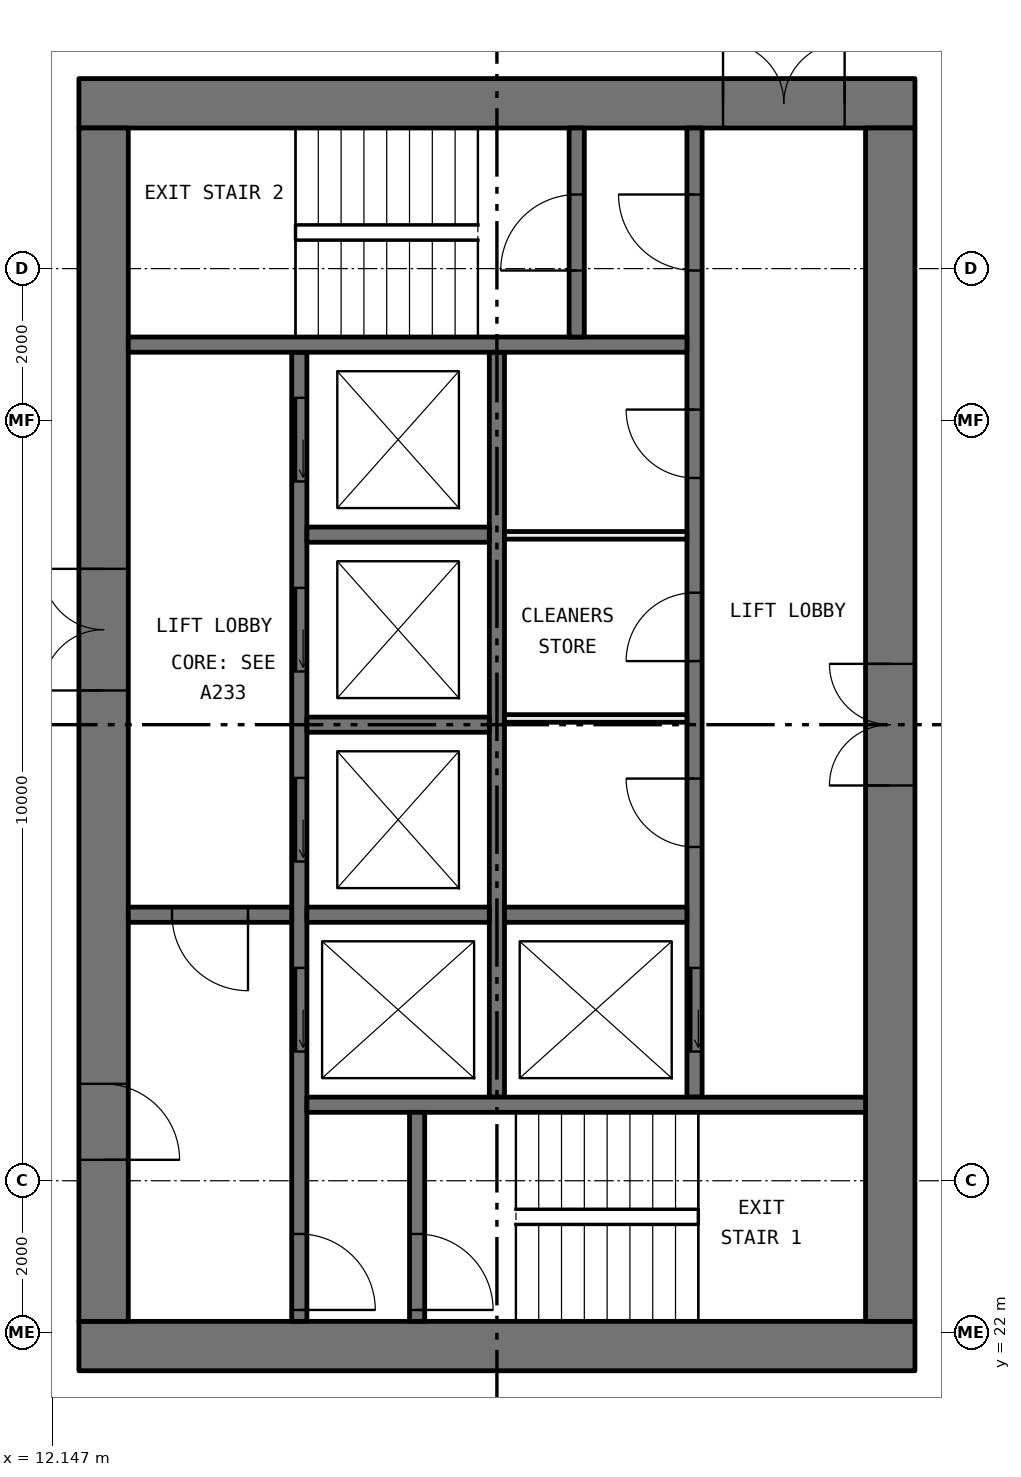
"""IFC4 building model, lengths in metres.
Left out: names, types, materials, properties, quantities, classifications, styles, units other than length and angle.
Written with IfcOpenShell. Run it as: python <this file> out.ifc"""

import sys

from ifc_helpers import new_model, si_unit, direction, frame, frame_2d, origin, place, context, subcontext, project, spatial, rectangle, extrude, element, fill, save


model = new_model("IFC4")
c1 = context("Model", 3, precision=1e-05, world=origin(), true_north=direction((0.0, 1.0)))
c2 = subcontext(c1, "Body", "Model", "MODEL_VIEW")
j1 = project(units=[si_unit("LENGTHUNIT", "METRE"), si_unit("PLANEANGLEUNIT", "RADIAN")], contexts=[c1])
p1 = place(None, origin())
s1 = spatial("IfcSite", under=j1, at=p1, CompositionType="ELEMENT")
p2 = place(p1, origin())
s2 = spatial("IfcBuilding", under=s1, at=p2, CompositionType="ELEMENT")
p3 = place(p2, frame((0.0, 0.0, 124.2)))
s3 = spatial("IfcBuildingStorey", under=s2, at=p3, CompositionType="ELEMENT", Elevation=124.2)
p4 = place(p3, frame((12.5, 21.825, 0.0), z_axis=(0.0, 0.0, 1.0), x_axis=(1.0, 0.0, 0.0)))
e1 = element("IfcWall", 1, at=p4, inside=s3, PredefinedType="SHEAR", context=c2, shape_type="SweptSolid", body=[
    extrude(rectangle(XDim=11.0, YDim=0.65, at=frame_2d((5.5, 0.0))), origin(), (0.0, 0.0, 1.0), 3.05),
])
p5 = place(p3, frame((12.5, 38.175, 0.0), z_axis=(0.0, 0.0, 1.0), x_axis=(1.0, 0.0, 0.0)))
e2 = element("IfcWall", 2, at=p5, inside=s3, PredefinedType="SHEAR", context=c2, shape_type="SweptSolid", body=[
    extrude(rectangle(XDim=11.0, YDim=0.65, at=frame_2d((5.5, 0.0))), origin(), (0.0, 0.0, 1.0), 3.05),
])
p6 = place(p5, frame((8.475, 0.0, 0.0)))
e3 = element("IfcOpeningElement", 3, at=p6, cuts=e2, PredefinedType="OPENING", context=c2, shape_type="SweptSolid", body=[
    extrude(rectangle(XDim=1.6, YDim=2.1, at=frame_2d((0.8, 1.05))), frame((0.0, 0.335, 0.0), z_axis=(0.0, -1.0, 0.0), x_axis=(1.0, 0.0, 0.0)), (0.0, 0.0, 1.0), 0.67),
])
p7 = place(p3, frame((12.825, 22.15, 0.0), z_axis=(0.0, 0.0, 1.0), x_axis=(0.0, 1.0, 0.0)))
e4 = element("IfcWall", 4, at=p7, inside=s3, PredefinedType="SHEAR", context=c2, shape_type="SweptSolid", body=[
    extrude(rectangle(XDim=15.7, YDim=0.65, at=frame_2d((7.85, 0.0))), origin(), (0.0, 0.0, 1.0), 3.05),
])
p8 = place(p7, frame((8.3, 0.0, 0.0)))
e5 = element("IfcOpeningElement", 5, at=p8, cuts=e4, PredefinedType="OPENING", context=c2, shape_type="SweptSolid", body=[
    extrude(rectangle(XDim=1.6, YDim=2.1, at=frame_2d((0.8, 1.05))), frame((0.0, 0.335, 0.0), z_axis=(0.0, -1.0, 0.0), x_axis=(1.0, 0.0, 0.0)), (0.0, 0.0, 1.0), 0.67),
])
p9 = place(p7, frame((2.125, 0.0, 0.0)))
e6 = element("IfcOpeningElement", 6, at=p9, cuts=e4, PredefinedType="OPENING", context=c2, shape_type="SweptSolid", body=[
    extrude(rectangle(XDim=1.0, YDim=2.1, at=frame_2d((0.5, 1.05))), frame((0.0, 0.335, 0.0), z_axis=(0.0, -1.0, 0.0), x_axis=(1.0, 0.0, 0.0)), (0.0, 0.0, 1.0), 0.67),
])
p10 = place(p3, frame((23.175, 22.15, 0.0), z_axis=(0.0, 0.0, 1.0), x_axis=(0.0, 1.0, 0.0)))
e7 = element("IfcWall", 7, at=p10, inside=s3, PredefinedType="SHEAR", context=c2, shape_type="SweptSolid", body=[
    extrude(rectangle(XDim=15.7, YDim=0.65, at=frame_2d((7.85, 0.0))), origin(), (0.0, 0.0, 1.0), 3.05),
])
p11 = place(p10, frame((7.05, 0.0, 0.0)))
e8 = element("IfcOpeningElement", 8, at=p11, cuts=e7, PredefinedType="OPENING", context=c2, shape_type="SweptSolid", body=[
    extrude(rectangle(XDim=1.6, YDim=2.1, at=frame_2d((0.8, 1.05))), frame((0.0, 0.335, 0.0), z_axis=(0.0, -1.0, 0.0), x_axis=(1.0, 0.0, 0.0)), (0.0, 0.0, 1.0), 0.67),
])
p12 = place(p3, frame((15.4, 22.15, 0.0), z_axis=(0.0, 0.0, 1.0), x_axis=(0.0, 1.0, 0.0)))
e9 = element("IfcWall", 9, at=p12, inside=s3, PredefinedType="SOLIDWALL", context=c2, shape_type="SweptSolid", body=[
    extrude(rectangle(XDim=12.75, YDim=0.2, at=frame_2d((6.375, 0.0))), origin(), (0.0, 0.0, 1.0), 3.05),
])
p13 = place(p12, frame((3.55, 0.0, 0.0)))
e10 = element("IfcOpeningElement", 10, at=p13, cuts=e9, PredefinedType="OPENING", context=c2, shape_type="SweptSolid", body=[
    extrude(rectangle(XDim=1.1, YDim=2.1, at=frame_2d((0.55, 1.05))), frame((0.0, 0.11, 0.0), z_axis=(0.0, -1.0, 0.0), x_axis=(1.0, 0.0, 0.0)), (0.0, 0.0, 1.0), 0.22),
])
p14 = place(p12, frame((6.05, 0.0, 0.0)))
e11 = element("IfcOpeningElement", 11, at=p14, cuts=e9, PredefinedType="OPENING", context=c2, shape_type="SweptSolid", body=[
    extrude(rectangle(XDim=1.1, YDim=2.1, at=frame_2d((0.55, 1.05))), frame((0.0, 0.11, 0.0), z_axis=(0.0, -1.0, 0.0), x_axis=(1.0, 0.0, 0.0)), (0.0, 0.0, 1.0), 0.22),
])
p15 = place(p12, frame((8.55, 0.0, 0.0)))
e12 = element("IfcOpeningElement", 12, at=p15, cuts=e9, PredefinedType="OPENING", context=c2, shape_type="SweptSolid", body=[
    extrude(rectangle(XDim=1.1, YDim=2.1, at=frame_2d((0.55, 1.05))), frame((0.0, 0.11, 0.0), z_axis=(0.0, -1.0, 0.0), x_axis=(1.0, 0.0, 0.0)), (0.0, 0.0, 1.0), 0.22),
])
p16 = place(p12, frame((11.05, 0.0, 0.0)))
e13 = element("IfcOpeningElement", 13, at=p16, cuts=e9, PredefinedType="OPENING", context=c2, shape_type="SweptSolid", body=[
    extrude(rectangle(XDim=1.1, YDim=2.1, at=frame_2d((0.55, 1.05))), frame((0.0, 0.11, 0.0), z_axis=(0.0, -1.0, 0.0), x_axis=(1.0, 0.0, 0.0)), (0.0, 0.0, 1.0), 0.22),
])
p17 = place(p12, frame((0.15, 0.0, 0.0)))
e14 = element("IfcOpeningElement", 14, at=p17, cuts=e9, PredefinedType="OPENING", context=c2, shape_type="SweptSolid", body=[
    extrude(rectangle(XDim=1.0, YDim=2.1, at=frame_2d((0.5, 1.05))), frame((0.0, 0.11, 0.0), z_axis=(0.0, -1.0, 0.0), x_axis=(1.0, 0.0, 0.0)), (0.0, 0.0, 1.0), 0.22),
])
p18 = place(p3, frame((20.6, 25.1, 0.0), z_axis=(0.0, 0.0, 1.0), x_axis=(0.0, 1.0, 0.0)))
e15 = element("IfcWall", 15, at=p18, inside=s3, PredefinedType="SOLIDWALL", context=c2, shape_type="SweptSolid", body=[
    extrude(rectangle(XDim=12.75, YDim=0.2, at=frame_2d((6.375, 0.0))), origin(), (0.0, 0.0, 1.0), 3.05),
])
p19 = place(p18, frame((0.6, 0.0, 0.0)))
e16 = element("IfcOpeningElement", 16, at=p19, cuts=e15, PredefinedType="OPENING", context=c2, shape_type="SweptSolid", body=[
    extrude(rectangle(XDim=1.1, YDim=2.1, at=frame_2d((0.55, 1.05))), frame((0.0, 0.11, 0.0), z_axis=(0.0, -1.0, 0.0), x_axis=(1.0, 0.0, 0.0)), (0.0, 0.0, 1.0), 0.22),
])
p20 = place(p18, frame((10.875, 0.0, 0.0)))
e17 = element("IfcOpeningElement", 17, at=p20, cuts=e15, PredefinedType="OPENING", context=c2, shape_type="SweptSolid", body=[
    extrude(rectangle(XDim=1.0, YDim=2.1, at=frame_2d((0.5, 1.05))), frame((0.0, 0.11, 0.0), z_axis=(0.0, -1.0, 0.0), x_axis=(1.0, 0.0, 0.0)), (0.0, 0.0, 1.0), 0.22),
])
p21 = place(p18, frame((3.291, 0.0, 0.0)))
e18 = element("IfcOpeningElement", 18, at=p21, cuts=e15, PredefinedType="OPENING", context=c2, shape_type="SweptSolid", body=[
    extrude(rectangle(XDim=0.9, YDim=2.1, at=frame_2d((0.45, 1.05))), frame((0.0, 0.11, 0.0), z_axis=(0.0, -1.0, 0.0), x_axis=(1.0, 0.0, 0.0)), (0.0, 0.0, 1.0), 0.22),
])
p22 = place(p18, frame((5.737, 0.0, 0.0)))
e19 = element("IfcOpeningElement", 19, at=p22, cuts=e15, PredefinedType="OPENING", context=c2, shape_type="SweptSolid", body=[
    extrude(rectangle(XDim=0.9, YDim=2.1, at=frame_2d((0.45, 1.05))), frame((0.0, 0.11, 0.0), z_axis=(0.0, -1.0, 0.0), x_axis=(1.0, 0.0, 0.0)), (0.0, 0.0, 1.0), 0.22),
])
p23 = place(p18, frame((8.146, 0.0, 0.0)))
e20 = element("IfcOpeningElement", 20, at=p23, cuts=e15, PredefinedType="OPENING", context=c2, shape_type="SweptSolid", body=[
    extrude(rectangle(XDim=0.9, YDim=2.1, at=frame_2d((0.45, 1.05))), frame((0.0, 0.11, 0.0), z_axis=(0.0, -1.0, 0.0), x_axis=(1.0, 0.0, 0.0)), (0.0, 0.0, 1.0), 0.22),
])
p24 = place(p3, frame((18.0, 25.1, 0.0), z_axis=(0.0, 0.0, 1.0), x_axis=(0.0, 1.0, 0.0)))
e21 = element("IfcWall", 21, at=p24, inside=s3, PredefinedType="SOLIDWALL", context=c2, shape_type="SweptSolid", body=[
    extrude(rectangle(XDim=9.8, YDim=0.2, at=frame_2d((4.9, 0.0))), origin(), (0.0, 0.0, 1.0), 3.05),
])
for number, where, z_axis, x_axis in (
    (22, (15.5, 25.0, 0.0), (0.0, 0.0, 1.0), (1.0, 0.0, 0.0)),
    (23, (13.15, 35.0, 0.0), (0.0, 0.0, 1.0), (1.0, 0.0, 0.0)),
):
    element("IfcWall", number, at=place(p3, frame(where, z_axis=z_axis, x_axis=x_axis)), inside=s3, PredefinedType="SOLIDWALL", context=c2, shape_type="SweptSolid", body=[
        extrude(rectangle(XDim=7.35, YDim=0.2, at=frame_2d((3.675, 0.0))), origin(), (0.0, 0.0, 1.0), 3.05),
    ])
p25 = place(p3, frame((13.15, 27.5, 0.0), z_axis=(0.0, 0.0, 1.0), x_axis=(1.0, 0.0, 0.0)))
e24 = element("IfcWall", 24, at=p25, inside=s3, PredefinedType="SOLIDWALL", context=c2, shape_type="SweptSolid", body=[
    extrude(rectangle(XDim=2.15, YDim=0.2, at=frame_2d((1.075, 0.0))), origin(), (0.0, 0.0, 1.0), 3.05),
])
p26 = place(p25, frame((0.575, 0.0, 0.0)))
e25 = element("IfcOpeningElement", 25, at=p26, cuts=e24, PredefinedType="OPENING", context=c2, shape_type="SweptSolid", body=[
    extrude(rectangle(XDim=1.0, YDim=2.1, at=frame_2d((0.5, 1.05))), frame((0.0, 0.11, 0.0), z_axis=(0.0, -1.0, 0.0), x_axis=(1.0, 0.0, 0.0)), (0.0, 0.0, 1.0), 0.22),
])
p27 = place(p3, frame((16.95, 22.15, 0.0), z_axis=(0.0, 0.0, 1.0), x_axis=(0.0, 1.0, 0.0)))
e26 = element("IfcWall", 26, at=p27, inside=s3, PredefinedType="SOLIDWALL", context=c2, shape_type="SweptSolid", body=[
    extrude(rectangle(XDim=2.75, YDim=0.2, at=frame_2d((1.375, 0.0))), origin(), (0.0, 0.0, 1.0), 3.05),
])
p28 = place(p27, frame((0.15, 0.0, 0.0)))
e27 = element("IfcOpeningElement", 27, at=p28, cuts=e26, PredefinedType="OPENING", context=c2, shape_type="SweptSolid", body=[
    extrude(rectangle(XDim=1.0, YDim=2.1, at=frame_2d((0.5, 1.05))), frame((0.0, 0.11, 0.0), z_axis=(0.0, -1.0, 0.0), x_axis=(1.0, 0.0, 0.0)), (0.0, 0.0, 1.0), 0.22),
])
p29 = place(p3, frame((19.05, 35.1, 0.0), z_axis=(0.0, 0.0, 1.0), x_axis=(0.0, 1.0, 0.0)))
e28 = element("IfcWall", 28, at=p29, inside=s3, PredefinedType="SOLIDWALL", context=c2, shape_type="SweptSolid", body=[
    extrude(rectangle(XDim=2.75, YDim=0.2, at=frame_2d((1.375, 0.0))), origin(), (0.0, 0.0, 1.0), 3.05),
])
p30 = place(p29, frame((0.875, 0.0, 0.0)))
e29 = element("IfcOpeningElement", 29, at=p30, cuts=e28, PredefinedType="OPENING", context=c2, shape_type="SweptSolid", body=[
    extrude(rectangle(XDim=1.0, YDim=2.1, at=frame_2d((0.5, 1.05))), frame((0.0, 0.11, 0.0), z_axis=(0.0, -1.0, 0.0), x_axis=(1.0, 0.0, 0.0)), (0.0, 0.0, 1.0), 0.22),
])
for number, where, z_axis, x_axis in (
    (30, (15.5, 27.5, 0.0), (0.0, 0.0, 1.0), (1.0, 0.0, 0.0)),
    (31, (15.5, 30.0, 0.0), (0.0, 0.0, 1.0), (1.0, 0.0, 0.0)),
    (32, (15.5, 32.5, 0.0), (0.0, 0.0, 1.0), (1.0, 0.0, 0.0)),
    (33, (18.1, 27.5, 0.0), (0.0, 0.0, 1.0), (1.0, 0.0, 0.0)),
):
    element("IfcWall", number, at=place(p3, frame(where, z_axis=z_axis, x_axis=x_axis)), inside=s3, PredefinedType="SOLIDWALL", context=c2, shape_type="SweptSolid", body=[
        extrude(rectangle(XDim=2.4, YDim=0.2, at=frame_2d((1.2, 0.0))), origin(), (0.0, 0.0, 1.0), 3.05),
    ])
for number, where, z_axis, x_axis in (
    (34, (18.1, 30.082, 0.0), (0.0, 0.0, 1.0), (1.0, 0.0, 0.0)),
    (35, (18.1, 32.491, 0.0), (0.0, 0.0, 1.0), (1.0, 0.0, 0.0)),
):
    element("IfcWall", number, at=place(p3, frame(where, z_axis=z_axis, x_axis=x_axis)), inside=s3, PredefinedType="PARTITIONING", context=c2, shape_type="SweptSolid", body=[
        extrude(rectangle(XDim=2.4, YDim=0.1, at=frame_2d((1.2, 0.0))), origin(), (0.0, 0.0, 1.0), 3.05),
    ])
p31 = place(p19, origin())
e36 = element("IfcDoor", 36, at=p31, inside=s3, OperationType="SLIDING_TO_LEFT", PredefinedType="DOOR", context=c2, shape_type="SweptSolid", body=[
    extrude(rectangle(XDim=1.1, YDim=2.1, at=frame_2d((0.55, 1.05))), frame((0.0, 0.025, 0.0), z_axis=(0.0, -1.0, 0.0), x_axis=(1.0, 0.0, 0.0)), (0.0, 0.0, 1.0), 0.05),
])
fill(e16, e36)
p32 = place(p13, origin())
e37 = element("IfcDoor", 37, at=p32, inside=s3, OperationType="SLIDING_TO_LEFT", PredefinedType="DOOR", context=c2, shape_type="SweptSolid", body=[
    extrude(rectangle(XDim=1.1, YDim=2.1, at=frame_2d((0.55, 1.05))), frame((0.0, 0.025, 0.0), z_axis=(0.0, -1.0, 0.0), x_axis=(1.0, 0.0, 0.0)), (0.0, 0.0, 1.0), 0.05),
])
fill(e10, e37)
p33 = place(p14, origin())
e38 = element("IfcDoor", 38, at=p33, inside=s3, OperationType="SLIDING_TO_LEFT", PredefinedType="DOOR", context=c2, shape_type="SweptSolid", body=[
    extrude(rectangle(XDim=1.1, YDim=2.1, at=frame_2d((0.55, 1.05))), frame((0.0, 0.025, 0.0), z_axis=(0.0, -1.0, 0.0), x_axis=(1.0, 0.0, 0.0)), (0.0, 0.0, 1.0), 0.05),
])
fill(e11, e38)
p34 = place(p15, origin())
e39 = element("IfcDoor", 39, at=p34, inside=s3, OperationType="SLIDING_TO_LEFT", PredefinedType="DOOR", context=c2, shape_type="SweptSolid", body=[
    extrude(rectangle(XDim=1.1, YDim=2.1, at=frame_2d((0.55, 1.05))), frame((0.0, 0.025, 0.0), z_axis=(0.0, -1.0, 0.0), x_axis=(1.0, 0.0, 0.0)), (0.0, 0.0, 1.0), 0.05),
])
fill(e12, e39)
p35 = place(p16, origin())
e40 = element("IfcDoor", 40, at=p35, inside=s3, OperationType="SLIDING_TO_LEFT", PredefinedType="DOOR", context=c2, shape_type="SweptSolid", body=[
    extrude(rectangle(XDim=1.1, YDim=2.1, at=frame_2d((0.55, 1.05))), frame((0.0, 0.025, 0.0), z_axis=(0.0, -1.0, 0.0), x_axis=(1.0, 0.0, 0.0)), (0.0, 0.0, 1.0), 0.05),
])
fill(e13, e40)
p36 = place(p28, frame((1.0, 0.0, 0.0), x_axis=(-1.0, 0.0, 0.0)))
e41 = element("IfcDoor", 41, at=p36, inside=s3, OperationType="SINGLE_SWING_LEFT", PredefinedType="DOOR", context=c2, shape_type="SweptSolid", body=[
    extrude(rectangle(XDim=1.0, YDim=2.1, at=frame_2d((0.5, 1.05))), frame((0.0, 0.025, 0.0), z_axis=(0.0, -1.0, 0.0), x_axis=(1.0, 0.0, 0.0)), (0.0, 0.0, 1.0), 0.05),
])
fill(e27, e41)
p37 = place(p17, frame((1.0, 0.0, 0.0), x_axis=(-1.0, 0.0, 0.0)))
e42 = element("IfcDoor", 42, at=p37, inside=s3, OperationType="SINGLE_SWING_LEFT", PredefinedType="DOOR", context=c2, shape_type="SweptSolid", body=[
    extrude(rectangle(XDim=1.0, YDim=2.1, at=frame_2d((0.5, 1.05))), frame((0.0, 0.025, 0.0), z_axis=(0.0, -1.0, 0.0), x_axis=(1.0, 0.0, 0.0)), (0.0, 0.0, 1.0), 0.05),
])
fill(e14, e42)
p38 = place(p20, origin())
e43 = element("IfcDoor", 43, at=p38, inside=s3, OperationType="SINGLE_SWING_LEFT", PredefinedType="DOOR", context=c2, shape_type="SweptSolid", body=[
    extrude(rectangle(XDim=1.0, YDim=2.1, at=frame_2d((0.5, 1.05))), frame((0.0, 0.025, 0.0), z_axis=(0.0, -1.0, 0.0), x_axis=(1.0, 0.0, 0.0)), (0.0, 0.0, 1.0), 0.05),
])
fill(e17, e43)
p39 = place(p30, origin())
e44 = element("IfcDoor", 44, at=p39, inside=s3, OperationType="SINGLE_SWING_RIGHT", PredefinedType="DOOR", context=c2, shape_type="SweptSolid", body=[
    extrude(rectangle(XDim=1.0, YDim=2.1, at=frame_2d((0.5, 1.05))), frame((0.0, 0.025, 0.0), z_axis=(0.0, -1.0, 0.0), x_axis=(1.0, 0.0, 0.0)), (0.0, 0.0, 1.0), 0.05),
])
fill(e29, e44)
p40 = place(p26, frame((1.0, 0.0, 0.0), x_axis=(-1.0, 0.0, 0.0)))
e45 = element("IfcDoor", 45, at=p40, inside=s3, OperationType="SINGLE_SWING_RIGHT", PredefinedType="DOOR", context=c2, shape_type="SweptSolid", body=[
    extrude(rectangle(XDim=1.0, YDim=2.1, at=frame_2d((0.5, 1.05))), frame((0.0, 0.025, 0.0), z_axis=(0.0, -1.0, 0.0), x_axis=(1.0, 0.0, 0.0)), (0.0, 0.0, 1.0), 0.05),
])
fill(e25, e45)
p41 = place(p8, origin())
e46 = element("IfcDoor", 46, at=p41, inside=s3, OperationType="DOUBLE_DOOR_SINGLE_SWING", PredefinedType="DOOR", context=c2, shape_type="SweptSolid", body=[
    extrude(rectangle(XDim=1.6, YDim=2.1, at=frame_2d((0.8, 1.05))), frame((0.0, 0.025, 0.0), z_axis=(0.0, -1.0, 0.0), x_axis=(1.0, 0.0, 0.0)), (0.0, 0.0, 1.0), 0.05),
])
fill(e5, e46)
p42 = place(p9, frame((1.0, 0.0, 0.0), x_axis=(-1.0, 0.0, 0.0)))
e47 = element("IfcDoor", 47, at=p42, inside=s3, OperationType="SINGLE_SWING_LEFT", PredefinedType="DOOR", context=c2, shape_type="SweptSolid", body=[
    extrude(rectangle(XDim=1.0, YDim=2.1, at=frame_2d((0.5, 1.05))), frame((0.0, 0.025, 0.0), z_axis=(0.0, -1.0, 0.0), x_axis=(1.0, 0.0, 0.0)), (0.0, 0.0, 1.0), 0.05),
])
fill(e6, e47)
p43 = place(p6, origin())
e48 = element("IfcDoor", 48, at=p43, inside=s3, OperationType="DOUBLE_DOOR_SINGLE_SWING", PredefinedType="DOOR", context=c2, shape_type="SweptSolid", body=[
    extrude(rectangle(XDim=1.6, YDim=2.1, at=frame_2d((0.8, 1.05))), frame((0.0, 0.025, 0.0), z_axis=(0.0, -1.0, 0.0), x_axis=(1.0, 0.0, 0.0)), (0.0, 0.0, 1.0), 0.05),
])
fill(e3, e48)
p44 = place(p11, origin())
e49 = element("IfcDoor", 49, at=p44, inside=s3, OperationType="DOUBLE_DOOR_SINGLE_SWING", PredefinedType="DOOR", context=c2, shape_type="SweptSolid", body=[
    extrude(rectangle(XDim=1.6, YDim=2.1, at=frame_2d((0.8, 1.05))), frame((0.0, 0.025, 0.0), z_axis=(0.0, -1.0, 0.0), x_axis=(1.0, 0.0, 0.0)), (0.0, 0.0, 1.0), 0.05),
])
fill(e8, e49)
p45 = place(p21, origin())
e50 = element("IfcDoor", 50, at=p45, inside=s3, OperationType="SINGLE_SWING_LEFT", PredefinedType="DOOR", context=c2, shape_type="SweptSolid", body=[
    extrude(rectangle(XDim=0.9, YDim=2.1, at=frame_2d((0.45, 1.05))), frame((0.0, 0.025, 0.0), z_axis=(0.0, -1.0, 0.0), x_axis=(1.0, 0.0, 0.0)), (0.0, 0.0, 1.0), 0.05),
])
fill(e18, e50)
p46 = place(p22, origin())
e51 = element("IfcDoor", 51, at=p46, inside=s3, OperationType="SINGLE_SWING_RIGHT", PredefinedType="DOOR", context=c2, shape_type="SweptSolid", body=[
    extrude(rectangle(XDim=0.9, YDim=2.1, at=frame_2d((0.45, 1.05))), frame((0.0, 0.025, 0.0), z_axis=(0.0, -1.0, 0.0), x_axis=(1.0, 0.0, 0.0)), (0.0, 0.0, 1.0), 0.05),
])
fill(e19, e51)
p47 = place(p23, origin())
e52 = element("IfcDoor", 52, at=p47, inside=s3, OperationType="SINGLE_SWING_LEFT", PredefinedType="DOOR", context=c2, shape_type="SweptSolid", body=[
    extrude(rectangle(XDim=0.9, YDim=2.1, at=frame_2d((0.45, 1.05))), frame((0.0, 0.025, 0.0), z_axis=(0.0, -1.0, 0.0), x_axis=(1.0, 0.0, 0.0)), (0.0, 0.0, 1.0), 0.05),
])
fill(e20, e52)
save(model, sys.argv[1])
